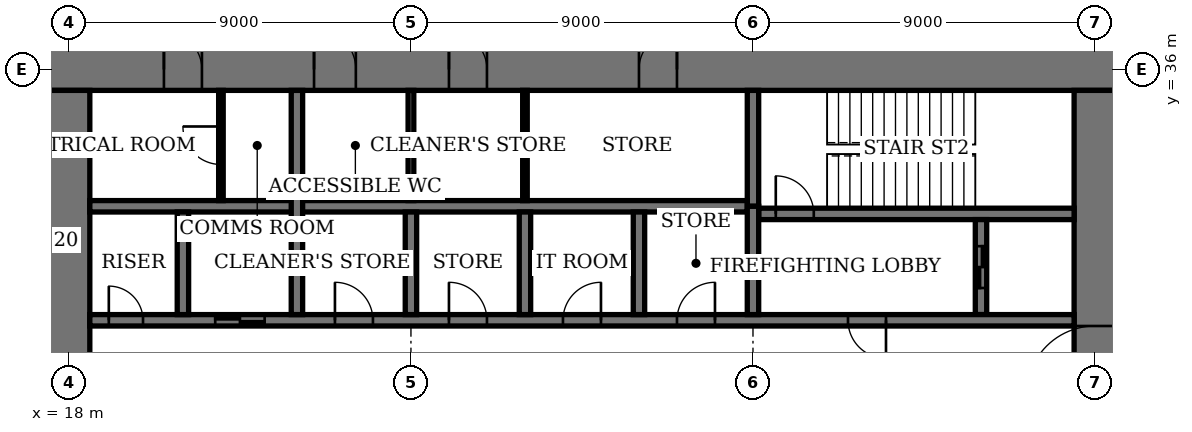
"""IFC4 building model, lengths in metres.
Left out: names, types, materials, properties, quantities, classifications, styles, units other than length and angle.
Written with IfcOpenShell. Run it as: python <this file> out.ifc"""

import sys

from ifc_helpers import new_model, si_unit, direction, frame, frame_2d, origin, place, context, subcontext, project, spatial, rectangle, extrude, element, fill, save


model = new_model("IFC4")
c1 = context("Model", 3, precision=1e-05, world=origin(), true_north=direction((0.0, 1.0)))
c2 = subcontext(c1, "Body", "Model", "MODEL_VIEW")
j1 = project(units=[si_unit("LENGTHUNIT", "METRE"), si_unit("PLANEANGLEUNIT", "RADIAN")], contexts=[c1])
p1 = place(None, origin())
s1 = spatial("IfcSite", under=j1, at=p1, CompositionType="ELEMENT")
p2 = place(p1, origin())
s2 = spatial("IfcBuilding", under=s1, at=p2, CompositionType="ELEMENT")
p3 = place(p2, frame((0.0, 0.0, 239.4)))
s3 = spatial("IfcBuildingStorey", under=s2, at=p3, CompositionType="ELEMENT", Elevation=239.4)
p4 = place(p3, frame((45.55, 36.0, 0.0), z_axis=(0.0, 0.0, 1.0), x_axis=(-1.0, 0.0, 0.0)))
e1 = element("IfcWall", 1, at=p4, inside=s3, PredefinedType="SHEAR", context=c2, shape_type="SweptSolid", body=[
    extrude(rectangle(XDim=28.1, YDim=1.1, at=frame_2d((14.05, 0.0))), origin(), (0.0, 0.0, 1.0), 4.0),
])
p5 = place(p4, frame((11.55, 0.0, 0.0)))
e2 = element("IfcOpeningElement", 2, at=p5, cuts=e1, PredefinedType="OPENING", context=c2, shape_type="SweptSolid", body=[
    extrude(rectangle(XDim=1.0, YDim=2.4, at=frame_2d((0.5, 1.2))), frame((0.0, 0.56, 0.0), z_axis=(0.0, -1.0, 0.0), x_axis=(1.0, 0.0, 0.0)), (0.0, 0.0, 1.0), 1.12),
])
p6 = place(p4, frame((16.55, 0.0, 0.0)))
e3 = element("IfcOpeningElement", 3, at=p6, cuts=e1, PredefinedType="OPENING", context=c2, shape_type="SweptSolid", body=[
    extrude(rectangle(XDim=1.0, YDim=2.4, at=frame_2d((0.5, 1.2))), frame((0.0, 0.56, 0.0), z_axis=(0.0, -1.0, 0.0), x_axis=(1.0, 0.0, 0.0)), (0.0, 0.0, 1.0), 1.12),
])
p7 = place(p4, frame((20.0, 0.0, 0.0)))
e4 = element("IfcOpeningElement", 4, at=p7, cuts=e1, PredefinedType="OPENING", context=c2, shape_type="SweptSolid", body=[
    extrude(rectangle(XDim=1.1, YDim=2.4, at=frame_2d((0.55, 1.2))), frame((0.0, 0.56, 0.0), z_axis=(0.0, -1.0, 0.0), x_axis=(1.0, 0.0, 0.0)), (0.0, 0.0, 1.0), 1.12),
])
p8 = place(p4, frame((24.05, 0.0, 0.0)))
e5 = element("IfcOpeningElement", 5, at=p8, cuts=e1, PredefinedType="OPENING", context=c2, shape_type="SweptSolid", body=[
    extrude(rectangle(XDim=1.0, YDim=2.4, at=frame_2d((0.5, 1.2))), frame((0.0, 0.56, 0.0), z_axis=(0.0, -1.0, 0.0), x_axis=(1.0, 0.0, 0.0)), (0.0, 0.0, 1.0), 1.12),
])
p9 = place(p3, frame((18.0, 35.45, 0.0), z_axis=(0.0, 0.0, 1.0), x_axis=(0.0, -1.0, 0.0)))
e6 = element("IfcWall", 6, at=p9, inside=s3, PredefinedType="SHEAR", context=c2, shape_type="SweptSolid", body=[
    extrude(rectangle(XDim=16.9, YDim=1.1, at=frame_2d((8.45, 0.0))), origin(), (0.0, 0.0, 1.0), 4.0),
])
p10 = place(p9, frame((8.9, 0.0, 0.0)))
e7 = element("IfcOpeningElement", 7, at=p10, cuts=e6, PredefinedType="OPENING", context=c2, shape_type="SweptSolid", body=[
    extrude(rectangle(XDim=1.8, YDim=2.4, at=frame_2d((0.9, 1.2))), frame((0.0, 0.56, 0.0), z_axis=(0.0, -1.0, 0.0), x_axis=(1.0, 0.0, 0.0)), (0.0, 0.0, 1.0), 1.12),
])
p11 = place(p3, frame((45.0, 18.55, 0.0), z_axis=(0.0, 0.0, 1.0), x_axis=(0.0, 1.0, 0.0)))
e8 = element("IfcWall", 8, at=p11, inside=s3, PredefinedType="SHEAR", context=c2, shape_type="SweptSolid", body=[
    extrude(rectangle(XDim=16.9, YDim=1.1, at=frame_2d((8.45, 0.0))), origin(), (0.0, 0.0, 1.0), 4.0),
])
p12 = place(p11, frame((8.9, 0.0, 0.0)))
e9 = element("IfcOpeningElement", 9, at=p12, cuts=e8, PredefinedType="OPENING", context=c2, shape_type="SweptSolid", body=[
    extrude(rectangle(XDim=1.8, YDim=2.4, at=frame_2d((0.9, 1.2))), frame((0.0, 0.56, 0.0), z_axis=(0.0, -1.0, 0.0), x_axis=(1.0, 0.0, 0.0)), (0.0, 0.0, 1.0), 1.12),
])
p13 = place(p3, frame((36.15, 32.2, 0.0), z_axis=(0.0, 0.0, 1.0), x_axis=(1.0, 0.0, 0.0)))
e10 = element("IfcWall", 10, at=p13, inside=s3, PredefinedType="SHEAR", context=c2, shape_type="SweptSolid", body=[
    extrude(rectangle(XDim=8.3, YDim=0.3, at=frame_2d((4.15, 0.0))), origin(), (0.0, 0.0, 1.0), 4.0),
])
p14 = place(p13, frame((0.45, 0.0, 0.0)))
e11 = element("IfcOpeningElement", 11, at=p14, cuts=e10, PredefinedType="OPENING", context=c2, shape_type="SweptSolid", body=[
    extrude(rectangle(XDim=1.0, YDim=2.4, at=frame_2d((0.5, 1.2))), frame((0.0, 0.16, 0.0), z_axis=(0.0, -1.0, 0.0), x_axis=(1.0, 0.0, 0.0)), (0.0, 0.0, 1.0), 0.32),
])
p15 = place(p3, frame((36.0, 32.4, 0.0), z_axis=(0.0, 0.0, 1.0), x_axis=(0.0, 1.0, 0.0)))
e12 = element("IfcWall", 12, at=p15, inside=s3, PredefinedType="SHEAR", context=c2, shape_type="SweptSolid", body=[
    extrude(rectangle(XDim=3.05, YDim=0.3, at=frame_2d((1.525, 0.0))), origin(), (0.0, 0.0, 1.0), 4.0),
])
p16 = place(p3, frame((42.0, 29.55, 0.0), z_axis=(0.0, 0.0, 1.0), x_axis=(0.0, 1.0, 0.0)))
e13 = element("IfcWall", 13, at=p16, inside=s3, PredefinedType="SHEAR", context=c2, shape_type="SweptSolid", body=[
    extrude(rectangle(XDim=2.5, YDim=0.3, at=frame_2d((1.25, 0.0))), origin(), (0.0, 0.0, 1.0), 4.0),
])
p17 = place(p16, frame((0.7, 0.0, 0.0)))
e14 = element("IfcOpeningElement", 14, at=p17, cuts=e13, PredefinedType="OPENING", context=c2, shape_type="SweptSolid", body=[
    extrude(rectangle(XDim=1.1, YDim=2.4, at=frame_2d((0.55, 1.2))), frame((0.0, 0.16, 0.0), z_axis=(0.0, -1.0, 0.0), x_axis=(1.0, 0.0, 0.0)), (0.0, 0.0, 1.0), 0.32),
])
p18 = place(p3, frame((18.55, 29.4, 0.0), z_axis=(0.0, 0.0, 1.0), x_axis=(1.0, 0.0, 0.0)))
e15 = element("IfcWall", 15, at=p18, inside=s3, PredefinedType="SHEAR", context=c2, shape_type="SweptSolid", body=[
    extrude(rectangle(XDim=25.9, YDim=0.3, at=frame_2d((12.95, 0.0))), origin(), (0.0, 0.0, 1.0), 4.0),
])
p19 = place(p18, frame((19.95, 0.0, 0.0)))
e16 = element("IfcOpeningElement", 16, at=p19, cuts=e15, PredefinedType="OPENING", context=c2, shape_type="SweptSolid", body=[
    extrude(rectangle(XDim=1.0, YDim=2.4, at=frame_2d((0.5, 1.2))), frame((0.0, 0.16, 0.0), z_axis=(0.0, -1.0, 0.0), x_axis=(1.0, 0.0, 0.0)), (0.0, 0.0, 1.0), 0.32),
])
p20 = place(p18, frame((0.5, 0.0, 0.0)))
e17 = element("IfcOpeningElement", 17, at=p20, cuts=e15, PredefinedType="OPENING", context=c2, shape_type="SweptSolid", body=[
    extrude(rectangle(XDim=0.9, YDim=2.1, at=frame_2d((0.45, 1.05))), frame((0.0, 0.16, 0.0), z_axis=(0.0, -1.0, 0.0), x_axis=(1.0, 0.0, 0.0)), (0.0, 0.0, 1.0), 0.32),
])
p21 = place(p18, frame((15.45, 0.0, 0.0)))
e18 = element("IfcOpeningElement", 18, at=p21, cuts=e15, PredefinedType="OPENING", context=c2, shape_type="SweptSolid", body=[
    extrude(rectangle(XDim=1.0, YDim=2.4, at=frame_2d((0.5, 1.2))), frame((0.0, 0.16, 0.0), z_axis=(0.0, -1.0, 0.0), x_axis=(1.0, 0.0, 0.0)), (0.0, 0.0, 1.0), 0.32),
])
p22 = place(p18, frame((12.45, 0.0, 0.0)))
e19 = element("IfcOpeningElement", 19, at=p22, cuts=e15, PredefinedType="OPENING", context=c2, shape_type="SweptSolid", body=[
    extrude(rectangle(XDim=1.0, YDim=2.4, at=frame_2d((0.5, 1.2))), frame((0.0, 0.16, 0.0), z_axis=(0.0, -1.0, 0.0), x_axis=(1.0, 0.0, 0.0)), (0.0, 0.0, 1.0), 0.32),
])
p23 = place(p18, frame((9.45, 0.0, 0.0)))
e20 = element("IfcOpeningElement", 20, at=p23, cuts=e15, PredefinedType="OPENING", context=c2, shape_type="SweptSolid", body=[
    extrude(rectangle(XDim=1.0, YDim=2.4, at=frame_2d((0.5, 1.2))), frame((0.0, 0.16, 0.0), z_axis=(0.0, -1.0, 0.0), x_axis=(1.0, 0.0, 0.0)), (0.0, 0.0, 1.0), 0.32),
])
p24 = place(p18, frame((6.45, 0.0, 0.0)))
e21 = element("IfcOpeningElement", 21, at=p24, cuts=e15, PredefinedType="OPENING", context=c2, shape_type="SweptSolid", body=[
    extrude(rectangle(XDim=1.0, YDim=2.4, at=frame_2d((0.5, 1.2))), frame((0.0, 0.16, 0.0), z_axis=(0.0, -1.0, 0.0), x_axis=(1.0, 0.0, 0.0)), (0.0, 0.0, 1.0), 0.32),
])
p25 = place(p18, frame((3.3, 0.0, 0.0)))
e22 = element("IfcOpeningElement", 22, at=p25, cuts=e15, PredefinedType="OPENING", context=c2, shape_type="SweptSolid", body=[
    extrude(rectangle(XDim=1.3, YDim=2.4, at=frame_2d((0.65, 1.2))), frame((0.0, 0.16, 0.0), z_axis=(0.0, -1.0, 0.0), x_axis=(1.0, 0.0, 0.0)), (0.0, 0.0, 1.0), 0.32),
])
p26 = place(p3, frame((18.55, 32.4, 0.0), z_axis=(0.0, 0.0, 1.0), x_axis=(1.0, 0.0, 0.0)))
e23 = element("IfcWall", 23, at=p26, inside=s3, PredefinedType="SHEAR", context=c2, shape_type="SweptSolid", body=[
    extrude(rectangle(XDim=17.3, YDim=0.3, at=frame_2d((8.65, 0.0))), origin(), (0.0, 0.0, 1.0), 4.0),
])
for number, where, z_axis, x_axis in (
    (24, (33.0, 29.55, 0.0), (0.0, 0.0, 1.0), (0.0, 1.0, 0.0)),
    (25, (30.0, 29.55, 0.0), (0.0, 0.0, 1.0), (0.0, 1.0, 0.0)),
    (26, (27.0, 29.55, 0.0), (0.0, 0.0, 1.0), (0.0, 1.0, 0.0)),
):
    element("IfcWall", number, at=place(p3, frame(where, z_axis=z_axis, x_axis=x_axis)), inside=s3, PredefinedType="SHEAR", context=c2, shape_type="SweptSolid", body=[
        extrude(rectangle(XDim=2.7, YDim=0.3, at=frame_2d((1.35, 0.0))), origin(), (0.0, 0.0, 1.0), 4.0),
    ])
p27 = place(p3, frame((24.0, 29.55, 0.0), z_axis=(0.0, 0.0, 1.0), x_axis=(0.0, 1.0, 0.0)))
e27 = element("IfcWall", 27, at=p27, inside=s3, PredefinedType="SHEAR", context=c2, shape_type="SweptSolid", body=[
    extrude(rectangle(XDim=5.9, YDim=0.3, at=frame_2d((2.95, 0.0))), origin(), (0.0, 0.0, 1.0), 4.0),
])
p28 = place(p3, frame((21.0, 29.55, 0.0), z_axis=(0.0, 0.0, 1.0), x_axis=(0.0, 1.0, 0.0)))
e28 = element("IfcWall", 28, at=p28, inside=s3, PredefinedType="SHEAR", context=c2, shape_type="SweptSolid", body=[
    extrude(rectangle(XDim=2.7, YDim=0.3, at=frame_2d((1.35, 0.0))), origin(), (0.0, 0.0, 1.0), 4.0),
])
p29 = place(p3, frame((36.0, 29.55, 0.0), z_axis=(0.0, 0.0, 1.0), x_axis=(0.0, 1.0, 0.0)))
e29 = element("IfcWall", 29, at=p29, inside=s3, PredefinedType="SHEAR", context=c2, shape_type="SweptSolid", body=[
    extrude(rectangle(XDim=2.85, YDim=0.3, at=frame_2d((1.425, 0.0))), origin(), (0.0, 0.0, 1.0), 4.0),
])
p30 = place(p3, frame((30.0, 32.55, 0.0), z_axis=(0.0, 0.0, 1.0), x_axis=(0.0, 1.0, 0.0)))
e30 = element("IfcWall", 30, at=p30, inside=s3, PredefinedType="PARTITIONING", context=c2, shape_type="SweptSolid", body=[
    extrude(rectangle(XDim=2.9, YDim=0.12, at=frame_2d((1.45, 0.0))), origin(), (0.0, 0.0, 1.0), 3.75),
])
p31 = place(p3, frame((27.0, 32.55, 0.0), z_axis=(0.0, 0.0, 1.0), x_axis=(0.0, 1.0, 0.0)))
e31 = element("IfcWall", 31, at=p31, inside=s3, PredefinedType="PARTITIONING", context=c2, shape_type="SweptSolid", body=[
    extrude(rectangle(XDim=2.9, YDim=0.15, at=frame_2d((1.45, 0.0))), origin(), (0.0, 0.0, 1.0), 3.75),
])
p32 = place(p3, frame((22.0, 32.55, 0.0), z_axis=(0.0, 0.0, 1.0), x_axis=(0.0, 1.0, 0.0)))
e32 = element("IfcWall", 32, at=p32, inside=s3, PredefinedType="PARTITIONING", context=c2, shape_type="SweptSolid", body=[
    extrude(rectangle(XDim=2.9, YDim=0.12, at=frame_2d((1.45, 0.0))), origin(), (0.0, 0.0, 1.0), 3.75),
])
p33 = place(p32, frame((0.95, 0.0, 0.0)))
e33 = element("IfcOpeningElement", 33, at=p33, cuts=e32, PredefinedType="OPENING", context=c2, shape_type="SweptSolid", body=[
    extrude(rectangle(XDim=1.0, YDim=2.4, at=frame_2d((0.5, 1.2))), frame((0.0, 0.07, 0.0), z_axis=(0.0, -1.0, 0.0), x_axis=(1.0, 0.0, 0.0)), (0.0, 0.0, 1.0), 0.14),
])
p34 = place(p12, origin())
e34 = element("IfcDoor", 34, at=p34, inside=s3, OperationType="DOUBLE_DOOR_DOUBLE_SWING", PredefinedType="DOOR", context=c2, shape_type="SweptSolid", body=[
    extrude(rectangle(XDim=1.8, YDim=2.4, at=frame_2d((0.9, 1.2))), frame((0.0, 0.03, 0.0), z_axis=(0.0, -1.0, 0.0), x_axis=(1.0, 0.0, 0.0)), (0.0, 0.0, 1.0), 0.06),
    extrude(rectangle(XDim=0.04, YDim=2.4, at=frame_2d((0.02, 1.2))), frame((0.0, 0.55, 0.0), z_axis=(0.0, -1.0, 0.0), x_axis=(1.0, 0.0, 0.0)), (0.0, 0.0, 1.0), 1.1),
    extrude(rectangle(XDim=0.04, YDim=2.4, at=frame_2d((1.78, 1.2))), frame((0.0, 0.55, 0.0), z_axis=(0.0, -1.0, 0.0), x_axis=(1.0, 0.0, 0.0)), (0.0, 0.0, 1.0), 1.1),
    extrude(rectangle(XDim=1.8, YDim=0.04, at=frame_2d((0.9, 2.38))), frame((0.0, 0.55, 0.0), z_axis=(0.0, -1.0, 0.0), x_axis=(1.0, 0.0, 0.0)), (0.0, 0.0, 1.0), 1.1),
])
fill(e9, e34)
p35 = place(p5, origin())
e35 = element("IfcDoor", 35, at=p35, inside=s3, OperationType="SINGLE_SWING_LEFT", PredefinedType="DOOR", context=c2, shape_type="SweptSolid", body=[
    extrude(rectangle(XDim=1.0, YDim=2.4, at=frame_2d((0.5, 1.2))), frame((0.0, 0.025, 0.0), z_axis=(0.0, -1.0, 0.0), x_axis=(1.0, 0.0, 0.0)), (0.0, 0.0, 1.0), 0.05),
    extrude(rectangle(XDim=0.04, YDim=2.4, at=frame_2d((0.02, 1.2))), frame((0.0, 0.4, 0.0), z_axis=(0.0, -1.0, 0.0), x_axis=(1.0, 0.0, 0.0)), (0.0, 0.0, 1.0), 0.8),
    extrude(rectangle(XDim=0.04, YDim=2.4, at=frame_2d((0.98, 1.2))), frame((0.0, 0.4, 0.0), z_axis=(0.0, -1.0, 0.0), x_axis=(1.0, 0.0, 0.0)), (0.0, 0.0, 1.0), 0.8),
    extrude(rectangle(XDim=1.0, YDim=0.04, at=frame_2d((0.5, 2.38))), frame((0.0, 0.4, 0.0), z_axis=(0.0, -1.0, 0.0), x_axis=(1.0, 0.0, 0.0)), (0.0, 0.0, 1.0), 0.8),
])
fill(e2, e35)
p36 = place(p6, origin())
e36 = element("IfcDoor", 36, at=p36, inside=s3, OperationType="SINGLE_SWING_RIGHT", PredefinedType="DOOR", context=c2, shape_type="SweptSolid", body=[
    extrude(rectangle(XDim=1.0, YDim=2.4, at=frame_2d((0.5, 1.2))), frame((0.0, 0.025, 0.0), z_axis=(0.0, -1.0, 0.0), x_axis=(1.0, 0.0, 0.0)), (0.0, 0.0, 1.0), 0.05),
    extrude(rectangle(XDim=0.04, YDim=2.4, at=frame_2d((0.02, 1.2))), frame((0.0, 0.4, 0.0), z_axis=(0.0, -1.0, 0.0), x_axis=(1.0, 0.0, 0.0)), (0.0, 0.0, 1.0), 0.8),
    extrude(rectangle(XDim=0.04, YDim=2.4, at=frame_2d((0.98, 1.2))), frame((0.0, 0.4, 0.0), z_axis=(0.0, -1.0, 0.0), x_axis=(1.0, 0.0, 0.0)), (0.0, 0.0, 1.0), 0.8),
    extrude(rectangle(XDim=1.0, YDim=0.04, at=frame_2d((0.5, 2.38))), frame((0.0, 0.4, 0.0), z_axis=(0.0, -1.0, 0.0), x_axis=(1.0, 0.0, 0.0)), (0.0, 0.0, 1.0), 0.8),
])
fill(e3, e36)
p37 = place(p7, origin())
e37 = element("IfcDoor", 37, at=p37, inside=s3, OperationType="SINGLE_SWING_RIGHT", PredefinedType="DOOR", context=c2, shape_type="SweptSolid", body=[
    extrude(rectangle(XDim=1.1, YDim=2.4, at=frame_2d((0.55, 1.2))), frame((0.0, 0.025, 0.0), z_axis=(0.0, -1.0, 0.0), x_axis=(1.0, 0.0, 0.0)), (0.0, 0.0, 1.0), 0.05),
    extrude(rectangle(XDim=0.04, YDim=2.4, at=frame_2d((0.02, 1.2))), frame((0.0, 0.44, 0.0), z_axis=(0.0, -1.0, 0.0), x_axis=(1.0, 0.0, 0.0)), (0.0, 0.0, 1.0), 0.88),
    extrude(rectangle(XDim=0.04, YDim=2.4, at=frame_2d((1.08, 1.2))), frame((0.0, 0.44, 0.0), z_axis=(0.0, -1.0, 0.0), x_axis=(1.0, 0.0, 0.0)), (0.0, 0.0, 1.0), 0.88),
    extrude(rectangle(XDim=1.1, YDim=0.04, at=frame_2d((0.55, 2.38))), frame((0.0, 0.44, 0.0), z_axis=(0.0, -1.0, 0.0), x_axis=(1.0, 0.0, 0.0)), (0.0, 0.0, 1.0), 0.88),
])
fill(e4, e37)
p38 = place(p8, origin())
e38 = element("IfcDoor", 38, at=p38, inside=s3, OperationType="SINGLE_SWING_RIGHT", PredefinedType="DOOR", context=c2, shape_type="SweptSolid", body=[
    extrude(rectangle(XDim=1.0, YDim=2.4, at=frame_2d((0.5, 1.2))), frame((0.0, 0.025, 0.0), z_axis=(0.0, -1.0, 0.0), x_axis=(1.0, 0.0, 0.0)), (0.0, 0.0, 1.0), 0.05),
    extrude(rectangle(XDim=0.04, YDim=2.4, at=frame_2d((0.02, 1.2))), frame((0.0, 0.4, 0.0), z_axis=(0.0, -1.0, 0.0), x_axis=(1.0, 0.0, 0.0)), (0.0, 0.0, 1.0), 0.8),
    extrude(rectangle(XDim=0.04, YDim=2.4, at=frame_2d((0.98, 1.2))), frame((0.0, 0.4, 0.0), z_axis=(0.0, -1.0, 0.0), x_axis=(1.0, 0.0, 0.0)), (0.0, 0.0, 1.0), 0.8),
    extrude(rectangle(XDim=1.0, YDim=0.04, at=frame_2d((0.5, 2.38))), frame((0.0, 0.4, 0.0), z_axis=(0.0, -1.0, 0.0), x_axis=(1.0, 0.0, 0.0)), (0.0, 0.0, 1.0), 0.8),
])
fill(e5, e38)
p39 = place(p14, origin())
e39 = element("IfcDoor", 39, at=p39, inside=s3, OperationType="SINGLE_SWING_RIGHT", PredefinedType="DOOR", context=c2, shape_type="SweptSolid", body=[
    extrude(rectangle(XDim=1.0, YDim=2.4, at=frame_2d((0.5, 1.2))), frame((0.0, 0.03, 0.0), z_axis=(0.0, -1.0, 0.0), x_axis=(1.0, 0.0, 0.0)), (0.0, 0.0, 1.0), 0.06),
])
fill(e11, e39)
p40 = place(p19, origin())
e40 = element("IfcDoor", 40, at=p40, inside=s3, OperationType="SINGLE_SWING_RIGHT", PredefinedType="DOOR", context=c2, shape_type="SweptSolid", body=[
    extrude(rectangle(XDim=1.0, YDim=2.4, at=frame_2d((0.5, 1.2))), frame((0.0, 0.03, 0.0), z_axis=(0.0, -1.0, 0.0), x_axis=(1.0, 0.0, 0.0)), (0.0, 0.0, 1.0), 0.06),
])
fill(e16, e40)
p41 = place(p20, origin())
e41 = element("IfcDoor", 41, at=p41, inside=s3, OperationType="SINGLE_SWING_RIGHT", PredefinedType="DOOR", context=c2, shape_type="SweptSolid", body=[
    extrude(rectangle(XDim=0.9, YDim=2.1, at=frame_2d((0.45, 1.05))), frame((0.0, 0.03, 0.0), z_axis=(0.0, -1.0, 0.0), x_axis=(1.0, 0.0, 0.0)), (0.0, 0.0, 1.0), 0.06),
])
fill(e17, e41)
p42 = place(p33, origin())
e42 = element("IfcDoor", 42, at=p42, inside=s3, OperationType="SINGLE_SWING_LEFT", PredefinedType="DOOR", context=c2, shape_type="SweptSolid", body=[
    extrude(rectangle(XDim=1.0, YDim=2.4, at=frame_2d((0.5, 1.2))), frame((0.0, 0.03, 0.0), z_axis=(0.0, -1.0, 0.0), x_axis=(1.0, 0.0, 0.0)), (0.0, 0.0, 1.0), 0.06),
])
fill(e33, e42)
p43 = place(p21, origin())
e43 = element("IfcDoor", 43, at=p43, inside=s3, OperationType="SINGLE_SWING_LEFT", PredefinedType="DOOR", context=c2, shape_type="SweptSolid", body=[
    extrude(rectangle(XDim=1.0, YDim=2.4, at=frame_2d((0.5, 1.2))), frame((0.0, 0.03, 0.0), z_axis=(0.0, -1.0, 0.0), x_axis=(1.0, 0.0, 0.0)), (0.0, 0.0, 1.0), 0.06),
])
fill(e18, e43)
p44 = place(p22, origin())
e44 = element("IfcDoor", 44, at=p44, inside=s3, OperationType="SINGLE_SWING_LEFT", PredefinedType="DOOR", context=c2, shape_type="SweptSolid", body=[
    extrude(rectangle(XDim=1.0, YDim=2.4, at=frame_2d((0.5, 1.2))), frame((0.0, 0.03, 0.0), z_axis=(0.0, -1.0, 0.0), x_axis=(1.0, 0.0, 0.0)), (0.0, 0.0, 1.0), 0.06),
])
fill(e19, e44)
p45 = place(p23, origin())
e45 = element("IfcDoor", 45, at=p45, inside=s3, OperationType="SINGLE_SWING_RIGHT", PredefinedType="DOOR", context=c2, shape_type="SweptSolid", body=[
    extrude(rectangle(XDim=1.0, YDim=2.4, at=frame_2d((0.5, 1.2))), frame((0.0, 0.03, 0.0), z_axis=(0.0, -1.0, 0.0), x_axis=(1.0, 0.0, 0.0)), (0.0, 0.0, 1.0), 0.06),
])
fill(e20, e45)
p46 = place(p24, origin())
e46 = element("IfcDoor", 46, at=p46, inside=s3, OperationType="SINGLE_SWING_RIGHT", PredefinedType="DOOR", context=c2, shape_type="SweptSolid", body=[
    extrude(rectangle(XDim=1.0, YDim=2.4, at=frame_2d((0.5, 1.2))), frame((0.0, 0.03, 0.0), z_axis=(0.0, -1.0, 0.0), x_axis=(1.0, 0.0, 0.0)), (0.0, 0.0, 1.0), 0.06),
])
fill(e21, e46)
p47 = place(p25, origin())
e47 = element("IfcDoor", 47, at=p47, inside=s3, OperationType="DOUBLE_DOOR_SLIDING", PredefinedType="DOOR", context=c2, shape_type="SweptSolid", body=[
    extrude(rectangle(XDim=1.3, YDim=2.4, at=frame_2d((0.65, 1.2))), frame((0.0, 0.02, 0.0), z_axis=(0.0, -1.0, 0.0), x_axis=(1.0, 0.0, 0.0)), (0.0, 0.0, 1.0), 0.04),
])
fill(e22, e47)
p48 = place(p17, origin())
e48 = element("IfcDoor", 48, at=p48, inside=s3, OperationType="DOUBLE_DOOR_SLIDING", PredefinedType="DOOR", context=c2, shape_type="SweptSolid", body=[
    extrude(rectangle(XDim=1.1, YDim=2.4, at=frame_2d((0.55, 1.2))), frame((0.0, 0.03, 0.0), z_axis=(0.0, -1.0, 0.0), x_axis=(1.0, 0.0, 0.0)), (0.0, 0.0, 1.0), 0.06),
])
fill(e14, e48)
save(model, sys.argv[1])
